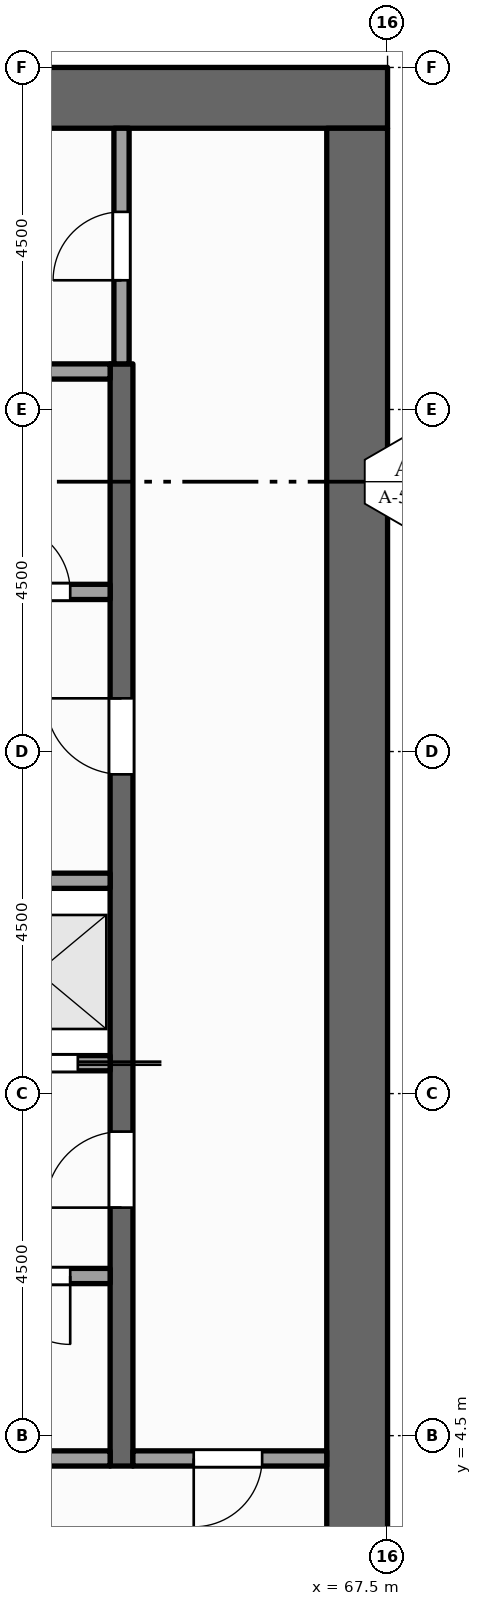
"""IFC4 building model, lengths in metres.
Left out: names, types, materials, properties, quantities, classifications, styles, units other than length and angle.
Written with IfcOpenShell. Run it as: python <this file> out.ifc"""

import sys

from ifc_helpers import new_model, si_unit, direction, frame, frame_2d, origin, place, context, subcontext, project, spatial, rectangle, extrude, element, fill, save


model = new_model("IFC4")
c1 = context("Model", 3, precision=1e-05, world=origin(), true_north=direction((0.0, 1.0)))
c2 = subcontext(c1, "Body", "Model", "MODEL_VIEW")
j1 = project(units=[si_unit("LENGTHUNIT", "METRE"), si_unit("PLANEANGLEUNIT", "RADIAN")], contexts=[c1])
p1 = place(None, origin())
s1 = spatial("IfcSite", under=j1, at=p1, CompositionType="ELEMENT")
p2 = place(p1, origin())
s2 = spatial("IfcBuilding", under=s1, at=p2, CompositionType="ELEMENT")
p3 = place(p2, frame((0.0, 0.0, 285.0)))
s3 = spatial("IfcBuildingStorey", under=s2, at=p3, CompositionType="ELEMENT", Elevation=285.0)
p4 = place(p3, frame((54.0, 22.1, -0.15), z_axis=(0.0, 0.0, 1.0), x_axis=(1.0, 0.0, 0.0)))
e1 = element("IfcWall", 1, at=p4, inside=s3, PredefinedType="SHEAR", context=c2, shape_type="SweptSolid", body=[
    extrude(rectangle(XDim=13.5, YDim=0.8, at=frame_2d((6.75, 0.0))), origin(), (0.0, 0.0, 1.0), 4.0),
])
p5 = place(p3, frame((67.1, 0.8, -0.15), z_axis=(0.0, 0.0, 1.0), x_axis=(0.0, 1.0, 0.0)))
e2 = element("IfcWall", 2, at=p5, inside=s3, PredefinedType="SHEAR", context=c2, shape_type="SweptSolid", body=[
    extrude(rectangle(XDim=20.9, YDim=0.8, at=frame_2d((10.45, 0.0))), origin(), (0.0, 0.0, 1.0), 4.0),
])
p6 = place(p3, frame((64.0, 4.1, 0.0), z_axis=(0.0, 0.0, 1.0), x_axis=(0.0, 1.0, 0.0)))
e3 = element("IfcWall", 3, at=p6, inside=s3, PredefinedType="SHEAR", context=c2, shape_type="SweptSolid", body=[
    extrude(rectangle(XDim=14.5, YDim=0.3, at=frame_2d((7.25, 0.0))), origin(), (0.0, 0.0, 1.0), 3.85),
])
p7 = place(p6, frame((3.4, 0.0, 0.0)))
e4 = element("IfcOpeningElement", 4, at=p7, cuts=e3, PredefinedType="OPENING", context=c2, shape_type="SweptSolid", body=[
    extrude(rectangle(XDim=1.0, YDim=2.1, at=frame_2d((0.5, 1.05))), frame((0.0, 0.16, 0.0), z_axis=(0.0, -1.0, 0.0), x_axis=(1.0, 0.0, 0.0)), (0.0, 0.0, 1.0), 0.32),
])
p8 = place(p6, frame((9.1, 0.0, 0.0)))
e5 = element("IfcOpeningElement", 5, at=p8, cuts=e3, PredefinedType="OPENING", context=c2, shape_type="SweptSolid", body=[
    extrude(rectangle(XDim=1.0, YDim=2.1, at=frame_2d((0.5, 1.05))), frame((0.0, 0.16, 0.0), z_axis=(0.0, -1.0, 0.0), x_axis=(1.0, 0.0, 0.0)), (0.0, 0.0, 1.0), 0.32),
])
p9 = place(p3, frame((64.0, 18.6, 0.0), z_axis=(0.0, 0.0, 1.0), x_axis=(0.0, 1.0, 0.0)))
e6 = element("IfcWall", 6, at=p9, inside=s3, PredefinedType="PARTITIONING", context=c2, shape_type="SweptSolid", body=[
    extrude(rectangle(XDim=3.1, YDim=0.2, at=frame_2d((1.55, 0.0))), origin(), (0.0, 0.0, 1.0), 3.85),
])
p10 = place(p9, frame((1.1, 0.0, 0.0)))
e7 = element("IfcOpeningElement", 7, at=p10, cuts=e6, PredefinedType="OPENING", context=c2, shape_type="SweptSolid", body=[
    extrude(rectangle(XDim=0.9, YDim=2.1, at=frame_2d((0.45, 1.05))), frame((0.0, 0.11, 0.0), z_axis=(0.0, -1.0, 0.0), x_axis=(1.0, 0.0, 0.0)), (0.0, 0.0, 1.0), 0.22),
])
p11 = place(p3, frame((61.9, 4.2, 0.0), z_axis=(0.0, 0.0, 1.0), x_axis=(1.0, 0.0, 0.0)))
e8 = element("IfcWall", 8, at=p11, inside=s3, PredefinedType="PARTITIONING", context=c2, shape_type="SweptSolid", body=[
    extrude(rectangle(XDim=1.95, YDim=0.2, at=frame_2d((0.975, 0.0))), origin(), (0.0, 0.0, 1.0), 3.85),
])
p12 = place(p3, frame((64.15, 4.2, 0.0), z_axis=(0.0, 0.0, 1.0), x_axis=(1.0, 0.0, 0.0)))
e9 = element("IfcWall", 9, at=p12, inside=s3, PredefinedType="PARTITIONING", context=c2, shape_type="SweptSolid", body=[
    extrude(rectangle(XDim=2.55, YDim=0.2, at=frame_2d((1.275, 0.0))), origin(), (0.0, 0.0, 1.0), 3.85),
])
p13 = place(p12, frame((0.8, 0.0, 0.0)))
e10 = element("IfcOpeningElement", 10, at=p13, cuts=e9, PredefinedType="OPENING", context=c2, shape_type="SweptSolid", body=[
    extrude(rectangle(XDim=0.9, YDim=2.1, at=frame_2d((0.45, 1.05))), frame((0.0, 0.11, 0.0), z_axis=(0.0, -1.0, 0.0), x_axis=(1.0, 0.0, 0.0)), (0.0, 0.0, 1.0), 0.22),
])
p14 = place(p3, frame((61.9, 6.6, 0.0), z_axis=(0.0, 0.0, 1.0), x_axis=(1.0, 0.0, 0.0)))
e11 = element("IfcWall", 11, at=p14, inside=s3, PredefinedType="PARTITIONING", context=c2, shape_type="SweptSolid", body=[
    extrude(rectangle(XDim=1.95, YDim=0.2, at=frame_2d((0.975, 0.0))), origin(), (0.0, 0.0, 1.0), 3.85),
])
p15 = place(p14, frame((0.525, 0.0, 0.0)))
e12 = element("IfcOpeningElement", 12, at=p15, cuts=e11, PredefinedType="OPENING", context=c2, shape_type="SweptSolid", body=[
    extrude(rectangle(XDim=0.9, YDim=2.1, at=frame_2d((0.45, 1.05))), frame((0.0, 0.11, 0.0), z_axis=(0.0, -1.0, 0.0), x_axis=(1.0, 0.0, 0.0)), (0.0, 0.0, 1.0), 0.22),
])
p16 = place(p3, frame((61.9, 9.4, 0.0), z_axis=(0.0, 0.0, 1.0), x_axis=(1.0, 0.0, 0.0)))
e13 = element("IfcWall", 13, at=p16, inside=s3, PredefinedType="SOLIDWALL", context=c2, shape_type="SweptSolid", body=[
    extrude(rectangle(XDim=1.95, YDim=0.2, at=frame_2d((0.975, 0.0))), origin(), (0.0, 0.0, 1.0), 3.85),
])
p17 = place(p16, frame((0.425, 0.0, 0.012)))
e14 = element("IfcOpeningElement", 14, at=p17, cuts=e13, PredefinedType="OPENING", context=c2, shape_type="SweptSolid", body=[
    extrude(rectangle(XDim=1.1, YDim=2.1, at=frame_2d((0.55, 1.05))), frame((0.0, 0.11, 0.0), z_axis=(0.0, -1.0, 0.0), x_axis=(1.0, 0.0, 0.0)), (0.0, 0.0, 1.0), 0.22),
])
p18 = place(p3, frame((61.9, 11.8, 0.0), z_axis=(0.0, 0.0, 1.0), x_axis=(1.0, 0.0, 0.0)))
e15 = element("IfcWall", 15, at=p18, inside=s3, PredefinedType="SOLIDWALL", context=c2, shape_type="SweptSolid", body=[
    extrude(rectangle(XDim=1.95, YDim=0.2, at=frame_2d((0.975, 0.0))), origin(), (0.0, 0.0, 1.0), 3.85),
])
p19 = place(p3, frame((61.9, 15.6, 0.0), z_axis=(0.0, 0.0, 1.0), x_axis=(1.0, 0.0, 0.0)))
e16 = element("IfcWall", 16, at=p19, inside=s3, PredefinedType="PARTITIONING", context=c2, shape_type="SweptSolid", body=[
    extrude(rectangle(XDim=1.95, YDim=0.2, at=frame_2d((0.975, 0.0))), origin(), (0.0, 0.0, 1.0), 3.85),
])
p20 = place(p19, frame((0.525, 0.0, 0.0)))
e17 = element("IfcOpeningElement", 17, at=p20, cuts=e16, PredefinedType="OPENING", context=c2, shape_type="SweptSolid", body=[
    extrude(rectangle(XDim=0.9, YDim=2.1, at=frame_2d((0.45, 1.05))), frame((0.0, 0.11, 0.0), z_axis=(0.0, -1.0, 0.0), x_axis=(1.0, 0.0, 0.0)), (0.0, 0.0, 1.0), 0.22),
])
p21 = place(p3, frame((61.9, 18.5, 0.0), z_axis=(0.0, 0.0, 1.0), x_axis=(1.0, 0.0, 0.0)))
e18 = element("IfcWall", 18, at=p21, inside=s3, PredefinedType="PARTITIONING", context=c2, shape_type="SweptSolid", body=[
    extrude(rectangle(XDim=1.95, YDim=0.2, at=frame_2d((0.975, 0.0))), origin(), (0.0, 0.0, 1.0), 3.85),
])
p22 = place(p17, origin())
e19 = element("IfcDoor", 19, at=p22, inside=s3, OperationType="SLIDING_TO_RIGHT", PredefinedType="DOOR", context=c2, shape_type="SweptSolid", body=[
    extrude(rectangle(XDim=1.1, YDim=2.1, at=frame_2d((0.55, 1.05))), frame((0.0, 0.025, 0.0), z_axis=(0.0, -1.0, 0.0), x_axis=(1.0, 0.0, 0.0)), (0.0, 0.0, 1.0), 0.05),
])
fill(e14, e19)
p23 = place(p7, origin())
e20 = element("IfcDoor", 20, at=p23, inside=s3, OperationType="SINGLE_SWING_LEFT", PredefinedType="DOOR", context=c2, shape_type="SweptSolid", body=[
    extrude(rectangle(XDim=1.0, YDim=2.1, at=frame_2d((0.5, 1.05))), frame((0.0, 0.025, 0.0), z_axis=(0.0, -1.0, 0.0), x_axis=(1.0, 0.0, 0.0)), (0.0, 0.0, 1.0), 0.05),
])
fill(e4, e20)
p24 = place(p8, origin())
e21 = element("IfcDoor", 21, at=p24, inside=s3, OperationType="SINGLE_SWING_RIGHT", PredefinedType="DOOR", context=c2, shape_type="SweptSolid", body=[
    extrude(rectangle(XDim=1.0, YDim=2.1, at=frame_2d((0.5, 1.05))), frame((0.0, 0.025, 0.0), z_axis=(0.0, -1.0, 0.0), x_axis=(1.0, 0.0, 0.0)), (0.0, 0.0, 1.0), 0.05),
])
fill(e5, e21)
p25 = place(p13, origin())
e22 = element("IfcDoor", 22, at=p25, inside=s3, OperationType="SINGLE_SWING_LEFT", PredefinedType="DOOR", context=c2, shape_type="SweptSolid", body=[
    extrude(rectangle(XDim=0.9, YDim=2.1, at=frame_2d((0.45, 1.05))), frame((0.0, 0.025, 0.0), z_axis=(0.0, -1.0, 0.0), x_axis=(1.0, 0.0, 0.0)), (0.0, 0.0, 1.0), 0.05),
])
fill(e10, e22)
p26 = place(p10, origin())
e23 = element("IfcDoor", 23, at=p26, inside=s3, OperationType="SINGLE_SWING_LEFT", PredefinedType="DOOR", context=c2, shape_type="SweptSolid", body=[
    extrude(rectangle(XDim=0.9, YDim=2.1, at=frame_2d((0.45, 1.05))), frame((0.0, 0.025, 0.0), z_axis=(0.0, -1.0, 0.0), x_axis=(1.0, 0.0, 0.0)), (0.0, 0.0, 1.0), 0.05),
])
fill(e7, e23)
p27 = place(p15, origin())
e24 = element("IfcDoor", 24, at=p27, inside=s3, OperationType="SINGLE_SWING_RIGHT", PredefinedType="DOOR", context=c2, shape_type="SweptSolid", body=[
    extrude(rectangle(XDim=0.9, YDim=2.1, at=frame_2d((0.45, 1.05))), frame((0.0, 0.025, 0.0), z_axis=(0.0, -1.0, 0.0), x_axis=(1.0, 0.0, 0.0)), (0.0, 0.0, 1.0), 0.05),
])
fill(e12, e24)
p28 = place(p20, origin())
e25 = element("IfcDoor", 25, at=p28, inside=s3, OperationType="SINGLE_SWING_LEFT", PredefinedType="DOOR", context=c2, shape_type="SweptSolid", body=[
    extrude(rectangle(XDim=0.9, YDim=2.1, at=frame_2d((0.45, 1.05))), frame((0.0, 0.025, 0.0), z_axis=(0.0, -1.0, 0.0), x_axis=(1.0, 0.0, 0.0)), (0.0, 0.0, 1.0), 0.05),
])
fill(e17, e25)
save(model, sys.argv[1])
